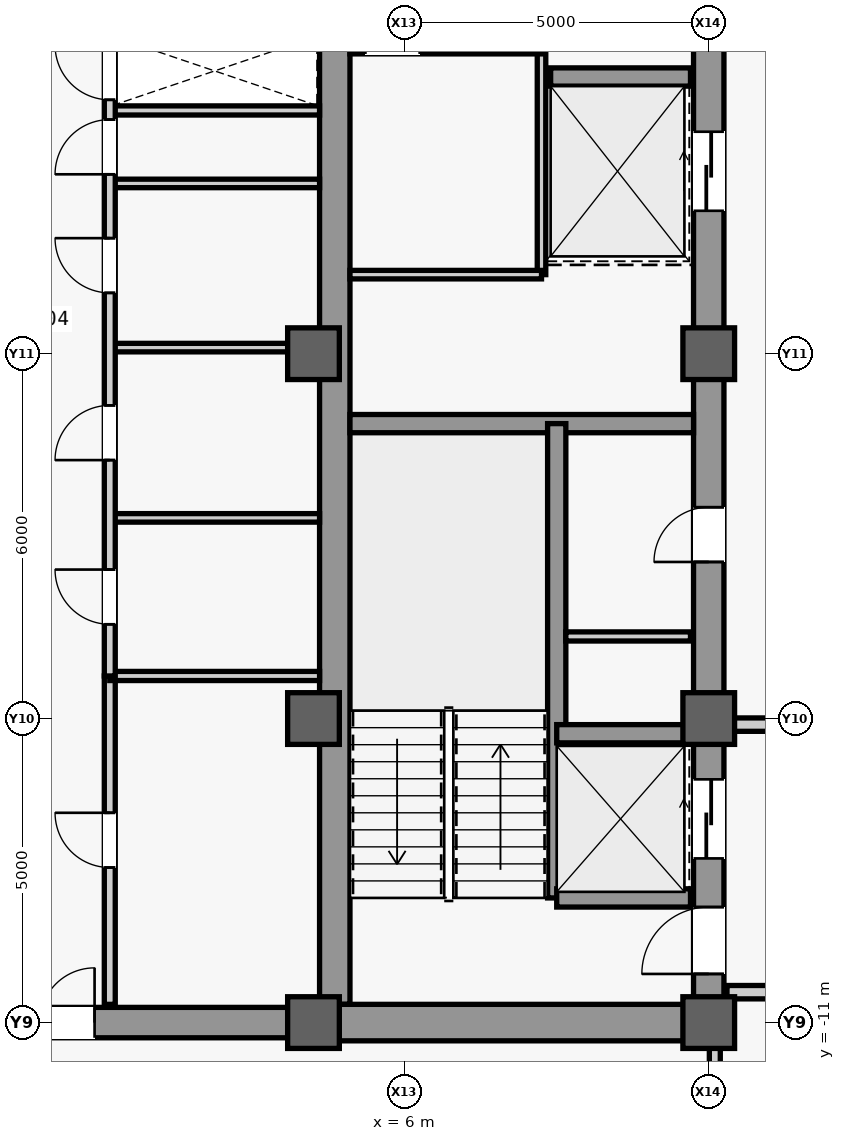
"""IFC4 building model, lengths in metres.
Left out: names, types, materials, properties, quantities, classifications, styles, units other than length and angle.
Written with IfcOpenShell. Run it as: python <this file> out.ifc"""

import sys

from ifc_helpers import new_model, si_unit, direction, frame, frame_2d, origin, origin_2d, place, context, subcontext, project, spatial, rectangle, extrude, source, transform, mapped, element, fill, save


model = new_model("IFC4")
c1 = context("Model", 3, precision=1e-05, world=origin(), true_north=direction((0.0, 1.0)))
c2 = subcontext(c1, "Body", "Model", "MODEL_VIEW")
j1 = project(units=[si_unit("LENGTHUNIT", "METRE"), si_unit("PLANEANGLEUNIT", "RADIAN")], contexts=[c1])
p1 = place(None, origin())
s1 = spatial("IfcSite", under=j1, at=p1, CompositionType="ELEMENT")
p2 = place(p1, origin())
s2 = spatial("IfcBuilding", under=s1, at=p2, CompositionType="ELEMENT")
p3 = place(p2, frame((0.0, 0.0, 247.1)))
s3 = spatial("IfcBuildingStorey", under=s2, at=p3, CompositionType="ELEMENT", Elevation=247.1)
m1 = source(origin(), c2, "Body", "SweptSolid", [
    extrude(rectangle(XDim=22.0, YDim=0.5, at=frame_2d((11.0, 0.0))), origin(), (0.0, 0.0, 1.0), 3.78),
])
p4 = place(p3, frame((11.0, -11.0, 0.0), z_axis=(0.0, 0.0, 1.0), x_axis=(0.0, 1.0, 0.0)))
e1 = element("IfcWall", 1, at=p4, inside=s3, PredefinedType="SHEAR", context=c2, shape_type="MappedRepresentation", body=[
    mapped(m1, transform((0.0, 0.0, 0.0), scale=1.0)),
])
m2 = source(origin(), c2, "Body", "SweptSolid", [
    extrude(rectangle(XDim=1.1, YDim=2.2, at=frame_2d((0.55, 1.1))), frame((0.0, 0.26, 0.0), z_axis=(0.0, -1.0, 0.0), x_axis=(1.0, 0.0, 0.0)), (0.0, 0.0, 1.0), 0.52),
])
p5 = place(p4, frame((0.8, 0.0, 0.0)))
e2 = element("IfcOpeningElement", 2, at=p5, cuts=e1, PredefinedType="OPENING", context=c2, shape_type="MappedRepresentation", body=[
    mapped(m2, transform((0.0, 0.0, 0.0), scale=1.0)),
])
m3 = source(origin(), c2, "Body", "SweptSolid", [
    extrude(rectangle(XDim=0.9, YDim=2.15, at=frame_2d((0.45, 1.075))), frame((0.0, 0.26, 0.0), z_axis=(0.0, -1.0, 0.0), x_axis=(1.0, 0.0, 0.0)), (0.0, 0.0, 1.0), 0.52),
])
p6 = place(p4, frame((7.575, 0.0, 0.0)))
e3 = element("IfcOpeningElement", 3, at=p6, cuts=e1, PredefinedType="OPENING", context=c2, shape_type="MappedRepresentation", body=[
    mapped(m3, transform((0.0, 0.0, 0.0), scale=1.0)),
])
m4 = source(origin(), c2, "Body", "SweptSolid", [
    extrude(rectangle(XDim=1.3, YDim=2.3, at=frame_2d((0.65, 1.15))), frame((0.0, 0.26, 0.0), z_axis=(0.0, -1.0, 0.0), x_axis=(1.0, 0.0, 0.0)), (0.0, 0.0, 1.0), 0.52),
])
p7 = place(p4, frame((2.7, 0.0, 0.0)))
e4 = element("IfcOpeningElement", 4, at=p7, cuts=e1, PredefinedType="OPENING", context=c2, shape_type="MappedRepresentation", body=[
    mapped(m4, transform((0.0, 0.0, 0.0), scale=1.0)),
])
p8 = place(p4, frame((13.35, 0.0, 0.0)))
e5 = element("IfcOpeningElement", 5, at=p8, cuts=e1, PredefinedType="OPENING", context=c2, shape_type="MappedRepresentation", body=[
    mapped(m4, transform((0.0, 0.0, 0.0), scale=1.0)),
])
m5 = source(origin(), c2, "Body", "SweptSolid", [
    extrude(rectangle(XDim=21.4, YDim=0.5, at=frame_2d((10.7, 0.0))), origin(), (0.0, 0.0, 1.0), 3.78),
])
p9 = place(p3, frame((4.85, -10.7, 0.0), z_axis=(0.0, 0.0, 1.0), x_axis=(0.0, 1.0, 0.0)))
e6 = element("IfcWall", 6, at=p9, inside=s3, PredefinedType="SHEAR", context=c2, shape_type="MappedRepresentation", body=[
    mapped(m5, transform((0.0, 0.0, 0.0), scale=1.0)),
])
m6 = source(origin(), c2, "Body", "SweptSolid", [
    extrude(rectangle(XDim=5.9, YDim=0.6, at=frame_2d((2.95, 0.0))), origin(), (0.0, 0.0, 1.0), 3.78),
])
p10 = place(p3, frame((4.85, -11.0, 0.0), z_axis=(0.0, 0.0, 1.0), x_axis=(1.0, 0.0, 0.0)))
e7 = element("IfcWall", 7, at=p10, inside=s3, PredefinedType="SHEAR", context=c2, shape_type="MappedRepresentation", body=[
    mapped(m6, transform((0.0, 0.0, 0.0), scale=1.0)),
])
m7 = source(origin(), c2, "Body", "SweptSolid", [
    extrude(rectangle(XDim=5.65, YDim=0.3, at=frame_2d((2.825, 0.0))), origin(), (0.0, 0.0, 1.0), 3.78),
])
p11 = place(p3, frame((5.1, -1.15, 0.0), z_axis=(0.0, 0.0, 1.0), x_axis=(1.0, 0.0, 0.0)))
e8 = element("IfcWall", 8, at=p11, inside=s3, PredefinedType="SHEAR", context=c2, shape_type="MappedRepresentation", body=[
    mapped(m7, transform((0.0, 0.0, 0.0), scale=1.0)),
])
m8 = source(origin(), c2, "Body", "SweptSolid", [
    extrude(rectangle(XDim=9.2, YDim=0.5, at=frame_2d((4.6, 0.0))), origin(), (0.0, 0.0, 1.0), 3.78),
])
p12 = place(p3, frame((-4.6, -11.0, 0.0), z_axis=(0.0, 0.0, 1.0), x_axis=(1.0, 0.0, 0.0)))
e9 = element("IfcWall", 9, at=p12, inside=s3, PredefinedType="SHEAR", context=c2, shape_type="MappedRepresentation", body=[
    mapped(m8, transform((0.0, 0.0, 0.0), scale=1.0)),
])
m9 = source(origin(), c2, "Body", "SweptSolid", [
    extrude(rectangle(XDim=1.8, YDim=2.25, at=frame_2d((0.9, 1.125))), frame((0.0, 0.26, 0.0), z_axis=(0.0, -1.0, 0.0), x_axis=(1.0, 0.0, 0.0)), (0.0, 0.0, 1.0), 0.52),
])
p13 = place(p12, frame((3.7, 0.0, 0.0)))
e10 = element("IfcOpeningElement", 10, at=p13, cuts=e9, PredefinedType="OPENING", context=c2, shape_type="MappedRepresentation", body=[
    mapped(m9, transform((0.0, 0.0, 0.0), scale=1.0)),
])
m10 = source(origin(), c2, "Body", "SweptSolid", [
    extrude(rectangle(XDim=0.85, YDim=0.85, at=origin_2d()), origin(), (0.0, 0.0, 1.0), 4.0),
])
for number, where, z_axis, x_axis in (
    (11, (4.5, -11.0, 0.0), (0.0, 0.0, 1.0), (1.0, 0.0, 0.0)),
    (12, (4.5, -6.0, 0.0), (0.0, 0.0, 1.0), (1.0, 0.0, 0.0)),
    (13, (4.5, 0.0, 0.0), (0.0, 0.0, 1.0), (1.0, 0.0, 0.0)),
    (14, (11.0, -11.0, 0.0), (0.0, 0.0, 1.0), (1.0, 0.0, 0.0)),
    (15, (11.0, -6.0, 0.0), (0.0, 0.0, 1.0), (1.0, 0.0, 0.0)),
    (16, (11.0, 0.0, 0.0), (0.0, 0.0, 1.0), (1.0, 0.0, 0.0)),
):
    element("IfcColumn", number, at=place(p3, frame(where, z_axis=z_axis, x_axis=x_axis)), inside=s3, PredefinedType="COLUMN", context=c2, shape_type="MappedRepresentation", body=[
        mapped(m10, transform((0.0, 0.0, 0.0), scale=1.0)),
    ])
m11 = source(origin(), c2, "Body", "SweptSolid", [
    extrude(rectangle(XDim=7.8, YDim=0.3, at=frame_2d((3.9, 0.0))), origin(), (0.0, 0.0, 1.0), 3.78),
])
p14 = place(p3, frame((8.5, -8.95, 0.0), z_axis=(0.0, 0.0, 1.0), x_axis=(0.0, 1.0, 0.0)))
e17 = element("IfcWall", 17, at=p14, inside=s3, PredefinedType="SHEAR", context=c2, shape_type="MappedRepresentation", body=[
    mapped(m11, transform((0.0, 0.0, 0.0), scale=1.0)),
])
m12 = source(origin(), c2, "Body", "SweptSolid", [
    extrude(rectangle(XDim=2.2, YDim=0.3, at=frame_2d((1.1, 0.0))), origin(), (0.0, 0.0, 1.0), 3.78),
])
for number, where, z_axis, x_axis in (
    (18, (8.5, -8.95, 0.0), (0.0, 0.0, 1.0), (1.0, 0.0, 0.0)),
    (19, (8.5, -6.25, 0.0), (0.0, 0.0, 1.0), (1.0, 0.0, 0.0)),
):
    element("IfcWall", number, at=place(p3, frame(where, z_axis=z_axis, x_axis=x_axis)), inside=s3, PredefinedType="SHEAR", context=c2, shape_type="MappedRepresentation", body=[
        mapped(m12, transform((0.0, 0.0, 0.0), scale=1.0)),
    ])
m13 = source(origin(), c2, "Body", "SweptSolid", [
    extrude(rectangle(XDim=2.3, YDim=0.3, at=frame_2d((1.15, 0.0))), origin(), (0.0, 0.0, 1.0), 3.78),
])
p15 = place(p3, frame((8.4, 4.55, 0.0), z_axis=(0.0, 0.0, 1.0), x_axis=(1.0, 0.0, 0.0)))
e20 = element("IfcWall", 20, at=p15, inside=s3, PredefinedType="SHEAR", context=c2, shape_type="MappedRepresentation", body=[
    mapped(m13, transform((0.0, 0.0, 0.0), scale=1.0)),
])
m14 = source(origin(), c2, "Body", "SweptSolid", [
    extrude(rectangle(XDim=2.05, YDim=0.15, at=frame_2d((1.025, 0.0))), origin(), (0.0, 0.0, 1.0), 3.78),
])
p16 = place(p3, frame((8.65, -4.65, 0.0), z_axis=(0.0, 0.0, 1.0), x_axis=(1.0, 0.0, 0.0)))
e21 = element("IfcWall", 21, at=p16, inside=s3, PredefinedType="PARTITIONING", context=c2, shape_type="MappedRepresentation", body=[
    mapped(m14, transform((0.0, 0.0, 0.0), scale=1.0)),
])
m15 = source(origin(), c2, "Body", "SweptSolid", [
    extrude(rectangle(XDim=9.4, YDim=0.14, at=frame_2d((4.7, 0.0))), origin(), (0.0, 0.0, 1.0), 3.78),
])
p17 = place(p3, frame((8.25, 1.3, 0.0), z_axis=(0.0, 0.0, 1.0), x_axis=(0.0, 1.0, 0.0)))
e22 = element("IfcWall", 22, at=p17, inside=s3, PredefinedType="PARTITIONING", context=c2, shape_type="MappedRepresentation", body=[
    mapped(m15, transform((0.0, 0.0, 0.0), scale=1.0)),
])
m16 = source(origin(), c2, "Body", "SweptSolid", [
    extrude(rectangle(XDim=3.15, YDim=0.14, at=frame_2d((1.575, 0.0))), origin(), (0.0, 0.0, 1.0), 3.78),
])
p18 = place(p3, frame((5.1, 1.3, 0.0), z_axis=(0.0, 0.0, 1.0), x_axis=(1.0, 0.0, 0.0)))
e23 = element("IfcWall", 23, at=p18, inside=s3, PredefinedType="PARTITIONING", context=c2, shape_type="MappedRepresentation", body=[
    mapped(m16, transform((0.0, 0.0, 0.0), scale=1.0)),
])
p19 = place(p3, frame((5.1, 5.0, 0.0), z_axis=(0.0, 0.0, 1.0), x_axis=(1.0, 0.0, 0.0)))
e24 = element("IfcWall", 24, at=p19, inside=s3, PredefinedType="PARTITIONING", context=c2, shape_type="MappedRepresentation", body=[
    mapped(m16, transform((0.0, 0.0, 0.0), scale=1.0)),
])
m17 = source(origin(), c2, "Body", "SweptSolid", [
    extrude(rectangle(XDim=0.9, YDim=2.15, at=frame_2d((0.45, 1.075))), frame((0.0, 0.08, 0.0), z_axis=(0.0, -1.0, 0.0), x_axis=(1.0, 0.0, 0.0)), (0.0, 0.0, 1.0), 0.16),
])
p20 = place(p19, frame((0.25, 0.0, 0.0)))
e25 = element("IfcOpeningElement", 25, at=p20, cuts=e24, PredefinedType="OPENING", context=c2, shape_type="MappedRepresentation", body=[
    mapped(m17, transform((0.0, 0.0, 0.0), scale=1.0)),
])
m18 = source(origin(), c2, "Body", "SweptSolid", [
    extrude(rectangle(XDim=4.05, YDim=0.22, at=frame_2d((2.025, 0.0))), origin(), (0.0, 0.0, 1.0), 3.78),
])
p21 = place(p3, frame((11.3, -10.5, 0.0), z_axis=(0.0, 0.0, 1.0), x_axis=(1.0, 0.0, 0.0)))
e26 = element("IfcWall", 26, at=p21, inside=s3, PredefinedType="PARTITIONING", context=c2, shape_type="MappedRepresentation", body=[
    mapped(m18, transform((0.0, 0.0, 0.0), scale=1.0)),
])
m19 = source(origin(), c2, "Body", "SweptSolid", [
    extrude(rectangle(XDim=4.05, YDim=0.22, at=frame_2d((2.025, 0.0))), origin(), (0.0, 0.0, 1.0), 3.085),
])
p22 = place(p3, frame((11.3, -6.1, 0.0), z_axis=(0.0, 0.0, 1.0), x_axis=(1.0, 0.0, 0.0)))
e27 = element("IfcWall", 27, at=p22, inside=s3, PredefinedType="PARTITIONING", context=c2, shape_type="MappedRepresentation", body=[
    mapped(m19, transform((0.0, 0.0, 0.0), scale=1.0)),
])
m20 = source(origin(), c2, "Body", "SweptSolid", [
    extrude(rectangle(XDim=3.45, YDim=0.15, at=frame_2d((1.725, 0.0))), origin(), (0.0, 0.0, 1.0), 3.78),
])
p23 = place(p3, frame((1.15, 4.0, 0.0), z_axis=(0.0, 0.0, 1.0), x_axis=(1.0, 0.0, 0.0)))
e28 = element("IfcWall", 28, at=p23, inside=s3, PredefinedType="PARTITIONING", context=c2, shape_type="MappedRepresentation", body=[
    mapped(m20, transform((0.0, 0.0, 0.0), scale=1.0)),
])
m21 = source(origin(), c2, "Body", "SweptSolid", [
    extrude(rectangle(XDim=5.4, YDim=0.18, at=frame_2d((2.7, 0.0))), origin(), (0.0, 0.0, 1.0), 3.78),
])
p24 = place(p3, frame((1.15, -10.7, 0.0), z_axis=(0.0, 0.0, 1.0), x_axis=(0.0, 1.0, 0.0)))
e29 = element("IfcWall", 29, at=p24, inside=s3, PredefinedType="PARTITIONING", context=c2, shape_type="MappedRepresentation", body=[
    mapped(m21, transform((0.0, 0.0, 0.0), scale=1.0)),
])
m22 = source(origin(), c2, "Body", "SweptSolid", [
    extrude(rectangle(XDim=0.9, YDim=2.15, at=frame_2d((0.45, 1.075))), frame((0.0, 0.1, 0.0), z_axis=(0.0, -1.0, 0.0), x_axis=(1.0, 0.0, 0.0)), (0.0, 0.0, 1.0), 0.2),
])
p25 = place(p24, frame((2.25, 0.0, 0.0)))
e30 = element("IfcOpeningElement", 30, at=p25, cuts=e29, PredefinedType="OPENING", context=c2, shape_type="MappedRepresentation", body=[
    mapped(m22, transform((0.0, 0.0, 0.0), scale=1.0)),
])
p26 = place(p3, frame((1.15, -5.3, 0.0), z_axis=(0.0, 0.0, 1.0), x_axis=(1.0, 0.0, 0.0)))
e31 = element("IfcWall", 31, at=p26, inside=s3, PredefinedType="PARTITIONING", context=c2, shape_type="MappedRepresentation", body=[
    mapped(m20, transform((0.0, 0.0, 0.0), scale=1.0)),
])
m23 = source(origin(), c2, "Body", "SweptSolid", [
    extrude(rectangle(XDim=3.45, YDim=0.14, at=frame_2d((1.725, 0.0))), origin(), (0.0, 0.0, 1.0), 3.78),
])
p27 = place(p3, frame((1.15, -2.7, 0.0), z_axis=(0.0, 0.0, 1.0), x_axis=(1.0, 0.0, 0.0)))
e32 = element("IfcWall", 32, at=p27, inside=s3, PredefinedType="PARTITIONING", context=c2, shape_type="MappedRepresentation", body=[
    mapped(m23, transform((0.0, 0.0, 0.0), scale=1.0)),
])
m24 = source(origin(), c2, "Body", "SweptSolid", [
    extrude(rectangle(XDim=3.45, YDim=0.14, at=frame_2d((1.725, 0.0))), origin(), (0.0, 0.0, 1.0), 3.085),
])
p28 = place(p3, frame((1.15, 0.1, 0.0), z_axis=(0.0, 0.0, 1.0), x_axis=(1.0, 0.0, 0.0)))
e33 = element("IfcWall", 33, at=p28, inside=s3, PredefinedType="PARTITIONING", context=c2, shape_type="MappedRepresentation", body=[
    mapped(m24, transform((0.0, 0.0, 0.0), scale=1.0)),
])
p29 = place(p3, frame((1.15, 2.8, 0.0), z_axis=(0.0, 0.0, 1.0), x_axis=(1.0, 0.0, 0.0)))
e34 = element("IfcWall", 34, at=p29, inside=s3, PredefinedType="PARTITIONING", context=c2, shape_type="MappedRepresentation", body=[
    mapped(m23, transform((0.0, 0.0, 0.0), scale=1.0)),
])
m25 = source(origin(), c2, "Body", "SweptSolid", [
    extrude(rectangle(XDim=10.6, YDim=0.18, at=frame_2d((5.3, 0.0))), origin(), (0.0, 0.0, 1.0), 3.78),
])
p30 = place(p3, frame((1.15, -5.3, 0.0), z_axis=(0.0, 0.0, 1.0), x_axis=(0.0, 1.0, 0.0)))
e35 = element("IfcWall", 35, at=p30, inside=s3, PredefinedType="PARTITIONING", context=c2, shape_type="MappedRepresentation", body=[
    mapped(m25, transform((0.0, 0.0, 0.0), scale=1.0)),
])
p31 = place(p30, frame((0.85, 0.0, 0.0)))
e36 = element("IfcOpeningElement", 36, at=p31, cuts=e35, PredefinedType="OPENING", context=c2, shape_type="MappedRepresentation", body=[
    mapped(m22, transform((0.0, 0.0, 0.0), scale=1.0)),
])
p32 = place(p30, frame((3.55, 0.0, 0.0)))
e37 = element("IfcOpeningElement", 37, at=p32, cuts=e35, PredefinedType="OPENING", context=c2, shape_type="MappedRepresentation", body=[
    mapped(m22, transform((0.0, 0.0, 0.0), scale=1.0)),
])
p33 = place(p30, frame((6.3, 0.0, 0.0)))
e38 = element("IfcOpeningElement", 38, at=p33, cuts=e35, PredefinedType="OPENING", context=c2, shape_type="MappedRepresentation", body=[
    mapped(m22, transform((0.0, 0.0, 0.0), scale=1.0)),
])
p34 = place(p30, frame((8.25, 0.0, 0.0)))
e39 = element("IfcOpeningElement", 39, at=p34, cuts=e35, PredefinedType="OPENING", context=c2, shape_type="MappedRepresentation", body=[
    mapped(m22, transform((0.0, 0.0, 0.0), scale=1.0)),
])
p35 = place(p30, frame((9.475, 0.0, 0.0)))
e40 = element("IfcOpeningElement", 40, at=p35, cuts=e35, PredefinedType="OPENING", context=c2, shape_type="MappedRepresentation", body=[
    mapped(m22, transform((0.0, 0.0, 0.0), scale=1.0)),
])
m26 = source(origin(), c2, "Body", "SweptSolid", [
    extrude(rectangle(XDim=2.6, YDim=0.18, at=frame_2d((1.3, 0.0))), origin(), (0.0, 0.0, 1.0), 3.085),
])
p36 = place(p3, frame((11.1, -13.6, 0.0), z_axis=(0.0, 0.0, 1.0), x_axis=(0.0, 1.0, 0.0)))
e41 = element("IfcWall", 41, at=p36, inside=s3, PredefinedType="PARTITIONING", context=c2, shape_type="MappedRepresentation", body=[
    mapped(m26, transform((0.0, 0.0, 0.0), scale=1.0)),
])
m27 = source(origin(), c2, "Body", "SweptSolid", [
    extrude(rectangle(XDim=1.1, YDim=2.2, at=frame_2d((0.55, 1.1))), frame((0.0, 0.025, 0.0), z_axis=(0.0, -1.0, 0.0), x_axis=(1.0, 0.0, 0.0)), (0.0, 0.0, 1.0), 0.05),
])
p37 = place(p5, origin())
e42 = element("IfcDoor", 42, at=p37, inside=s3, OperationType="SINGLE_SWING_LEFT", PredefinedType="DOOR", context=c2, shape_type="MappedRepresentation", body=[
    mapped(m27, transform((0.0, 0.0, 0.0), scale=1.0)),
])
fill(e2, e42)
m28 = source(origin(), c2, "Body", "SweptSolid", [
    extrude(rectangle(XDim=0.9, YDim=2.15, at=frame_2d((0.45, 1.075))), frame((0.0, 0.025, 0.0), z_axis=(0.0, -1.0, 0.0), x_axis=(1.0, 0.0, 0.0)), (0.0, 0.0, 1.0), 0.05),
])
p38 = place(p6, origin())
e43 = element("IfcDoor", 43, at=p38, inside=s3, OperationType="SINGLE_SWING_LEFT", PredefinedType="DOOR", context=c2, shape_type="MappedRepresentation", body=[
    mapped(m28, transform((0.0, 0.0, 0.0), scale=1.0)),
])
fill(e3, e43)
p39 = place(p25, origin())
e44 = element("IfcDoor", 44, at=p39, inside=s3, OperationType="SINGLE_SWING_RIGHT", PredefinedType="DOOR", context=c2, shape_type="MappedRepresentation", body=[
    mapped(m28, transform((0.0, 0.0, 0.0), scale=1.0)),
])
fill(e30, e44)
m29 = source(origin(), c2, "Body", "SweptSolid", [
    extrude(rectangle(XDim=1.8, YDim=2.25, at=frame_2d((0.9, 1.125))), frame((0.0, 0.025, 0.0), z_axis=(0.0, -1.0, 0.0), x_axis=(1.0, 0.0, 0.0)), (0.0, 0.0, 1.0), 0.05),
])
p40 = place(p13, origin())
e45 = element("IfcDoor", 45, at=p40, inside=s3, OperationType="SINGLE_SWING_LEFT", PredefinedType="DOOR", context=c2, shape_type="MappedRepresentation", body=[
    mapped(m29, transform((0.0, 0.0, 0.0), scale=1.0)),
])
fill(e10, e45)
p41 = place(p31, origin())
e46 = element("IfcDoor", 46, at=p41, inside=s3, OperationType="SINGLE_SWING_RIGHT", PredefinedType="DOOR", context=c2, shape_type="MappedRepresentation", body=[
    mapped(m28, transform((0.0, 0.0, 0.0), scale=1.0)),
])
fill(e36, e46)
p42 = place(p32, origin())
e47 = element("IfcDoor", 47, at=p42, inside=s3, OperationType="SINGLE_SWING_LEFT", PredefinedType="DOOR", context=c2, shape_type="MappedRepresentation", body=[
    mapped(m28, transform((0.0, 0.0, 0.0), scale=1.0)),
])
fill(e37, e47)
p43 = place(p33, origin())
e48 = element("IfcDoor", 48, at=p43, inside=s3, OperationType="SINGLE_SWING_RIGHT", PredefinedType="DOOR", context=c2, shape_type="MappedRepresentation", body=[
    mapped(m28, transform((0.0, 0.0, 0.0), scale=1.0)),
])
fill(e38, e48)
p44 = place(p34, origin())
e49 = element("IfcDoor", 49, at=p44, inside=s3, OperationType="SINGLE_SWING_LEFT", PredefinedType="DOOR", context=c2, shape_type="MappedRepresentation", body=[
    mapped(m28, transform((0.0, 0.0, 0.0), scale=1.0)),
])
fill(e39, e49)
p45 = place(p35, origin())
e50 = element("IfcDoor", 50, at=p45, inside=s3, OperationType="SINGLE_SWING_RIGHT", PredefinedType="DOOR", context=c2, shape_type="MappedRepresentation", body=[
    mapped(m28, transform((0.0, 0.0, 0.0), scale=1.0)),
])
fill(e40, e50)
m30 = source(origin(), c2, "Body", "SweptSolid", [
    extrude(rectangle(XDim=1.3, YDim=2.3, at=frame_2d((0.65, 1.15))), frame((0.0, 0.025, 0.0), z_axis=(0.0, -1.0, 0.0), x_axis=(1.0, 0.0, 0.0)), (0.0, 0.0, 1.0), 0.05),
])
p46 = place(p7, origin())
e51 = element("IfcDoor", 51, at=p46, inside=s3, OperationType="SLIDING_TO_LEFT", PredefinedType="DOOR", context=c2, shape_type="MappedRepresentation", body=[
    mapped(m30, transform((0.0, 0.0, 0.0), scale=1.0)),
])
fill(e4, e51)
p47 = place(p8, origin())
e52 = element("IfcDoor", 52, at=p47, inside=s3, OperationType="SLIDING_TO_LEFT", PredefinedType="DOOR", context=c2, shape_type="MappedRepresentation", body=[
    mapped(m30, transform((0.0, 0.0, 0.0), scale=1.0)),
])
fill(e5, e52)
save(model, sys.argv[1])
